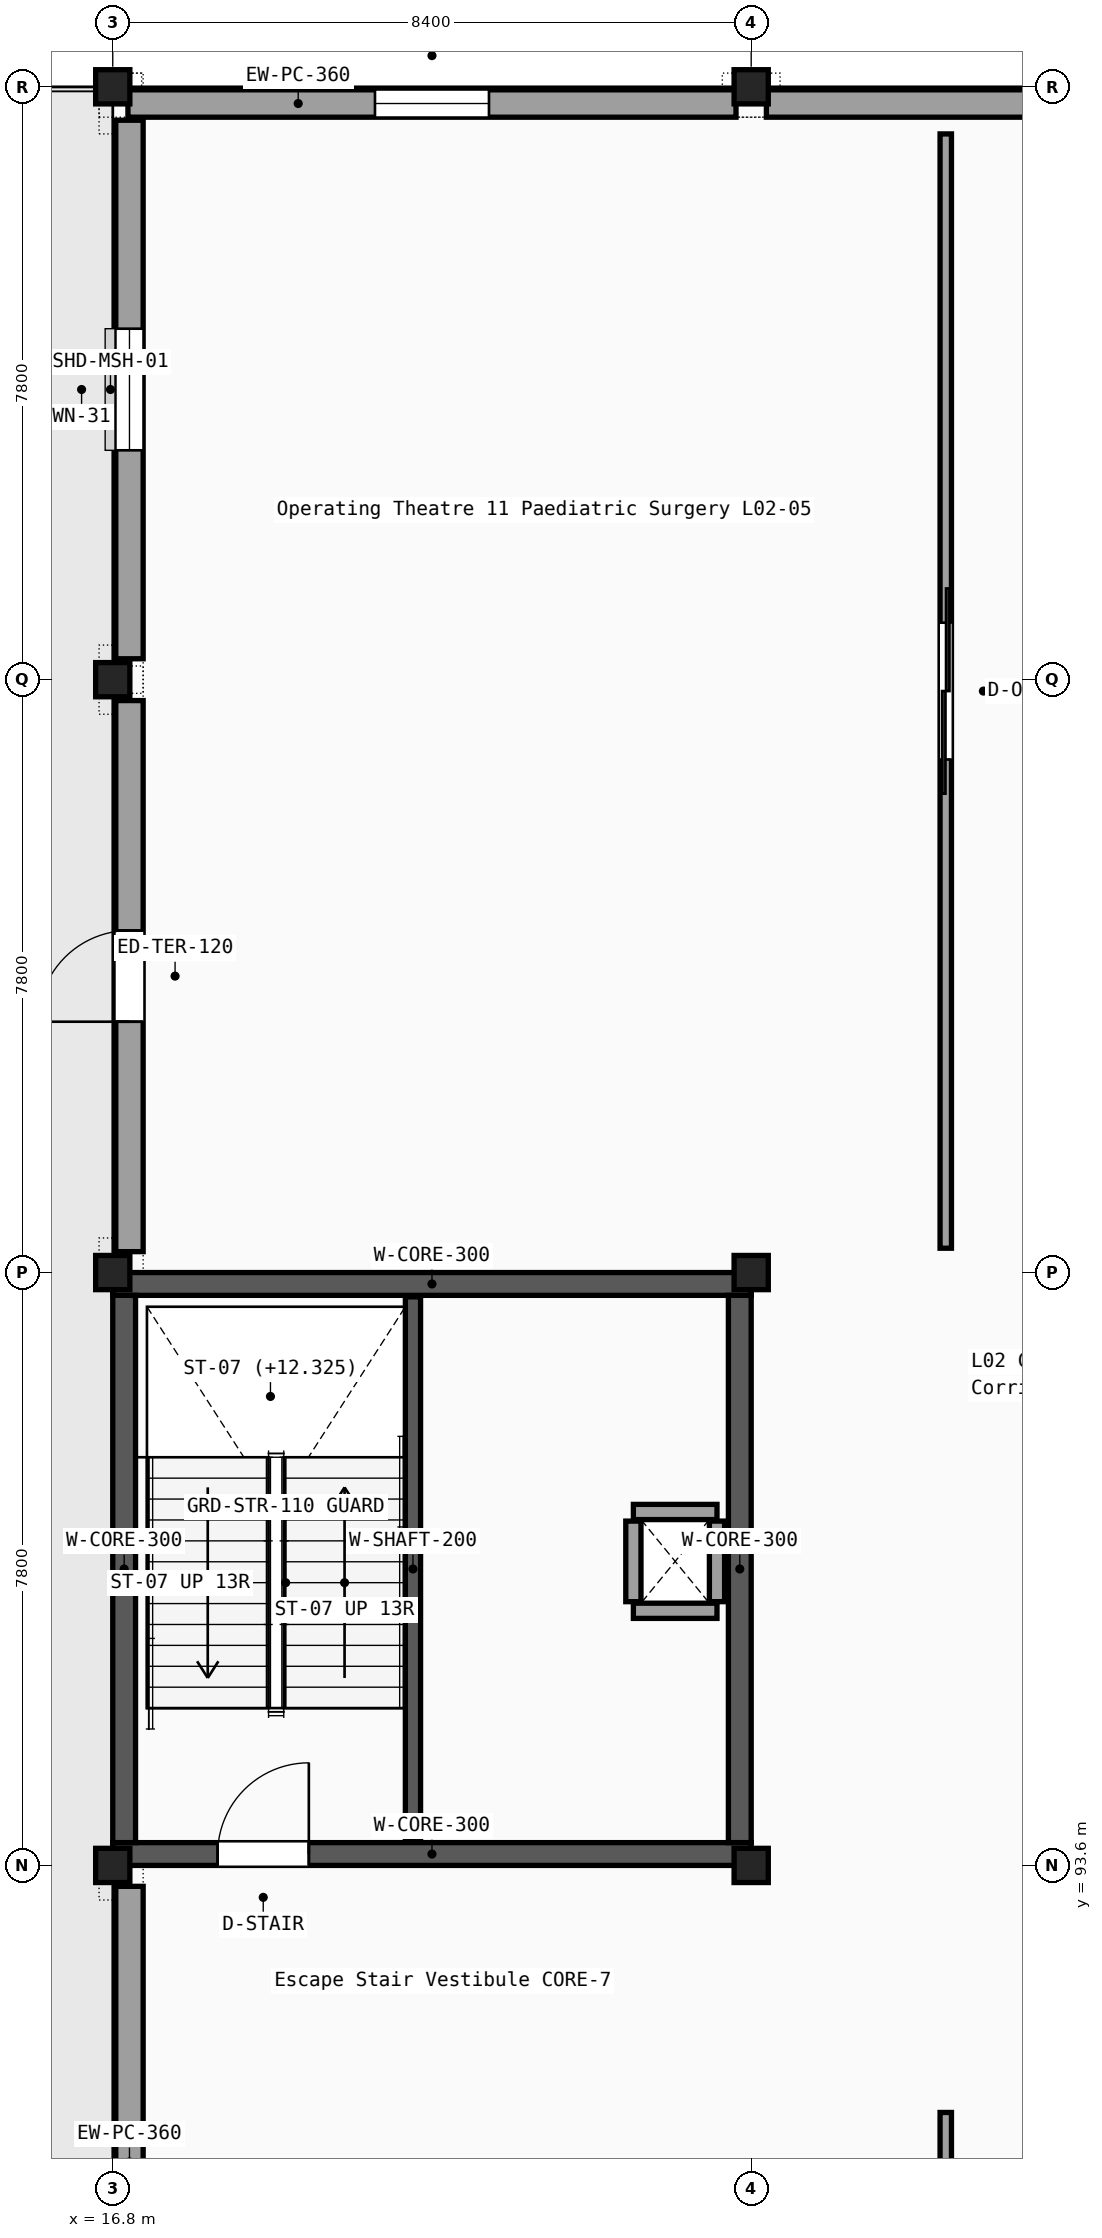
"""IFC4 building model, lengths in metres.
Left out: names, types, materials, properties, quantities, classifications, styles, units other than length and angle.
Written with IfcOpenShell. Run it as: python <this file> out.ifc"""

import sys

from ifc_helpers import new_model, si_unit, direction, frame, frame_2d, origin, origin_2d, place, context, subcontext, project, spatial, rectangle, i_section, extrude, element, fill, save


model = new_model("IFC4")
c1 = context("Model", 3, precision=1e-05, world=origin(), true_north=direction((0.0, 1.0)))
c2 = subcontext(c1, "Body", "Model", "MODEL_VIEW")
j1 = project(units=[si_unit("LENGTHUNIT", "METRE"), si_unit("PLANEANGLEUNIT", "RADIAN")], contexts=[c1])
p1 = place(None, origin())
s1 = spatial("IfcSite", under=j1, at=p1, CompositionType="ELEMENT")
p2 = place(p1, origin())
s2 = spatial("IfcBuilding", under=s1, at=p2, CompositionType="ELEMENT")
p3 = place(p2, frame((0.0, 0.0, 10.2)))
s3 = spatial("IfcBuildingStorey", under=s2, at=p3, CompositionType="ELEMENT", Elevation=10.2)
for number, where, z_axis, x_axis in (
    (1, (16.8, 93.6, 0.0), (0.0, 0.0, 1.0), (1.0, 0.0, 0.0)),
    (2, (16.8, 101.4, 0.0), (0.0, 0.0, 1.0), (1.0, 0.0, 0.0)),
    (3, (16.8, 109.2, 0.0), (0.0, 0.0, 1.0), (1.0, 0.0, 0.0)),
    (4, (16.8, 117.0, 0.0), (0.0, 0.0, 1.0), (1.0, 0.0, 0.0)),
    (5, (25.2, 93.6, 0.0), (0.0, 0.0, 1.0), (1.0, 0.0, 0.0)),
    (6, (25.2, 101.4, 0.0), (0.0, 0.0, 1.0), (1.0, 0.0, 0.0)),
    (7, (25.2, 117.0, 0.0), (0.0, 0.0, 1.0), (1.0, 0.0, 0.0)),
):
    element("IfcColumn", number, at=place(p3, frame(where, z_axis=z_axis, x_axis=x_axis)), inside=s3, PredefinedType="COLUMN", context=c2, shape_type="SweptSolid", body=[
        extrude(i_section(OverallWidth=0.3, OverallDepth=0.45, WebThickness=0.014, FlangeThickness=0.026, FilletRadius=0.027, at=origin_2d()), origin(), (0.0, 0.0, 1.0), 4.65),
    ])
p4 = place(p3, frame((17.02, 86.075, 0.0), z_axis=(0.0, 0.0, 1.0), x_axis=(0.0, 1.0, 0.0)))
e8 = element("IfcWall", 8, at=p4, inside=s3, PredefinedType="SOLIDWALL", context=c2, shape_type="SweptSolid", body=[
    extrude(rectangle(XDim=7.25, YDim=0.36, at=frame_2d((3.625, 0.0))), origin(), (0.0, 0.0, 1.0), 3.82),
])
p5 = place(p3, frame((17.02, 101.675, 0.0), z_axis=(0.0, 0.0, 1.0), x_axis=(0.0, 1.0, 0.0)))
e9 = element("IfcWall", 9, at=p5, inside=s3, PredefinedType="SOLIDWALL", context=c2, shape_type="SweptSolid", body=[
    extrude(rectangle(XDim=7.25, YDim=0.36, at=frame_2d((3.625, 0.0))), origin(), (0.0, 0.0, 1.0), 3.97),
])
p6 = place(p5, frame((3.025, 0.0, 0.0)))
e10 = element("IfcOpeningElement", 10, at=p6, cuts=e9, PredefinedType="OPENING", context=c2, shape_type="SweptSolid", body=[
    extrude(rectangle(XDim=1.2, YDim=2.2, at=frame_2d((0.6, 1.1))), frame((0.0, 0.19, 0.0), z_axis=(0.0, -1.0, 0.0), x_axis=(1.0, 0.0, 0.0)), (0.0, 0.0, 1.0), 0.38),
])
p7 = place(p3, frame((17.02, 109.475, 0.0), z_axis=(0.0, 0.0, 1.0), x_axis=(0.0, 1.0, 0.0)))
e11 = element("IfcWall", 11, at=p7, inside=s3, PredefinedType="SOLIDWALL", context=c2, shape_type="SweptSolid", body=[
    extrude(rectangle(XDim=7.085, YDim=0.36, at=frame_2d((3.542, 0.0))), origin(), (0.0, 0.0, 1.0), 4.01),
])
p8 = place(p7, frame((2.742, 0.0, 0.95)))
e12 = element("IfcOpeningElement", 12, at=p8, cuts=e11, PredefinedType="OPENING", context=c2, shape_type="SweptSolid", body=[
    extrude(rectangle(XDim=1.6, YDim=1.55, at=frame_2d((0.8, 0.775))), frame((0.0, 0.19, 0.0), z_axis=(0.0, -1.0, 0.0), x_axis=(1.0, 0.0, 0.0)), (0.0, 0.0, 1.0), 0.38),
])
p9 = place(p3, frame((17.0, 116.78, 0.0), z_axis=(0.0, 0.0, 1.0), x_axis=(1.0, 0.0, 0.0)))
e13 = element("IfcWall", 13, at=p9, inside=s3, PredefinedType="SOLIDWALL", context=c2, shape_type="SweptSolid", body=[
    extrude(rectangle(XDim=8.0, YDim=0.36, at=frame_2d((4.0, 0.0))), origin(), (0.0, 0.0, 1.0), 4.01),
])
p10 = place(p9, frame((3.25, 0.0, 0.8)))
e14 = element("IfcOpeningElement", 14, at=p10, cuts=e13, PredefinedType="OPENING", context=c2, shape_type="SweptSolid", body=[
    extrude(rectangle(XDim=1.5, YDim=1.75, at=frame_2d((0.75, 0.875))), frame((0.0, 0.19, 0.0), z_axis=(0.0, -1.0, 0.0), x_axis=(1.0, 0.0, 0.0)), (0.0, 0.0, 1.0), 0.38),
])
p11 = place(p3, frame((25.4, 116.78, 0.0), z_axis=(0.0, 0.0, 1.0), x_axis=(1.0, 0.0, 0.0)))
e15 = element("IfcWall", 15, at=p11, inside=s3, PredefinedType="SOLIDWALL", context=c2, shape_type="SweptSolid", body=[
    extrude(rectangle(XDim=8.0, YDim=0.36, at=frame_2d((4.0, 0.0))), origin(), (0.0, 0.0, 1.0), 4.01),
])
p12 = place(p3, frame((16.8, 93.75, 0.0), z_axis=(0.0, 0.0, 1.0), x_axis=(1.0, 0.0, 0.0)))
e16 = element("IfcWall", 16, at=p12, inside=s3, PredefinedType="SHEAR", context=c2, shape_type="SweptSolid", body=[
    extrude(rectangle(XDim=8.4, YDim=0.3, at=frame_2d((4.2, 0.0))), origin(), (0.0, 0.0, 1.0), 4.38),
])
p13 = place(p12, frame((1.38, 0.0, 0.0)))
e17 = element("IfcOpeningElement", 17, at=p13, cuts=e16, PredefinedType="OPENING", context=c2, shape_type="SweptSolid", body=[
    extrude(rectangle(XDim=1.2, YDim=2.15, at=frame_2d((0.6, 1.075))), frame((0.0, 0.16, 0.0), z_axis=(0.0, -1.0, 0.0), x_axis=(1.0, 0.0, 0.0)), (0.0, 0.0, 1.0), 0.32),
])
p14 = place(p3, frame((16.8, 101.25, 0.0), z_axis=(0.0, 0.0, 1.0), x_axis=(1.0, 0.0, 0.0)))
e18 = element("IfcWall", 18, at=p14, inside=s3, PredefinedType="SHEAR", context=c2, shape_type="SweptSolid", body=[
    extrude(rectangle(XDim=8.4, YDim=0.3, at=frame_2d((4.2, 0.0))), origin(), (0.0, 0.0, 1.0), 4.38),
])
for number, where, z_axis, x_axis in (
    (19, (16.95, 93.9, 0.0), (0.0, 0.0, 1.0), (0.0, 1.0, 0.0)),
    (20, (25.05, 93.9, 0.0), (0.0, 0.0, 1.0), (0.0, 1.0, 0.0)),
):
    element("IfcWall", number, at=place(p3, frame(where, z_axis=z_axis, x_axis=x_axis)), inside=s3, PredefinedType="SHEAR", context=c2, shape_type="SweptSolid", body=[
        extrude(rectangle(XDim=7.2, YDim=0.3, at=frame_2d((3.6, 0.0))), origin(), (0.0, 0.0, 1.0), 4.38),
    ])
p15 = place(p3, frame((20.75, 93.92, 0.0), z_axis=(0.0, 0.0, 1.0), x_axis=(0.0, 1.0, 0.0)))
e21 = element("IfcWall", 21, at=p15, inside=s3, PredefinedType="SHEAR", context=c2, shape_type="SweptSolid", body=[
    extrude(rectangle(XDim=7.16, YDim=0.2, at=frame_2d((3.58, 0.0))), origin(), (0.0, 0.0, 1.0), 4.38),
])
for number, where, z_axis, x_axis in (
    (22, (23.65, 96.95, 0.0), (0.0, 0.0, 1.0), (1.0, 0.0, 0.0)),
    (23, (23.65, 98.25, 0.0), (0.0, 0.0, 1.0), (1.0, 0.0, 0.0)),
):
    element("IfcWall", number, at=place(p3, frame(where, z_axis=z_axis, x_axis=x_axis)), inside=s3, PredefinedType="PARTITIONING", context=c2, shape_type="SweptSolid", body=[
        extrude(rectangle(XDim=1.1, YDim=0.2, at=frame_2d((0.55, 0.0))), origin(), (0.0, 0.0, 1.0), 3.82),
    ])
for number, where, z_axis, x_axis in (
    (24, (23.65, 97.07, 0.0), (0.0, 0.0, 1.0), (0.0, 1.0, 0.0)),
    (25, (24.75, 97.07, 0.0), (0.0, 0.0, 1.0), (0.0, 1.0, 0.0)),
):
    element("IfcWall", number, at=place(p3, frame(where, z_axis=z_axis, x_axis=x_axis)), inside=s3, PredefinedType="PARTITIONING", context=c2, shape_type="SweptSolid", body=[
        extrude(rectangle(XDim=1.06, YDim=0.2, at=frame_2d((0.53, 0.0))), origin(), (0.0, 0.0, 1.0), 3.82),
    ])
p16 = place(p3, frame((27.76, 77.867, 0.0), z_axis=(0.0, 0.0, 1.0), x_axis=(0.0, 1.0, 0.0)))
e26 = element("IfcWall", 26, at=p16, inside=s3, PredefinedType="PARTITIONING", context=c2, shape_type="SweptSolid", body=[
    extrude(rectangle(XDim=12.483, YDim=0.15, at=frame_2d((6.241, 0.0))), origin(), (0.0, 0.0, 1.0), 3.82),
])
p17 = place(p16, frame((5.341, 0.0, 0.0)))
e27 = element("IfcOpeningElement", 27, at=p17, cuts=e26, PredefinedType="OPENING", context=c2, shape_type="SweptSolid", body=[
    extrude(rectangle(XDim=1.8, YDim=2.4, at=frame_2d((0.9, 1.2))), frame((0.0, 0.085, 0.0), z_axis=(0.0, -1.0, 0.0), x_axis=(1.0, 0.0, 0.0)), (0.0, 0.0, 1.0), 0.17),
])
p18 = place(p3, frame((27.76, 101.72, 0.0), z_axis=(0.0, 0.0, 1.0), x_axis=(0.0, 1.0, 0.0)))
e28 = element("IfcWall", 28, at=p18, inside=s3, PredefinedType="PARTITIONING", context=c2, shape_type="SweptSolid", body=[
    extrude(rectangle(XDim=14.66, YDim=0.15, at=frame_2d((7.33, 0.0))), origin(), (0.0, 0.0, 1.0), 4.0),
])
p19 = place(p18, frame((6.43, 0.0, 0.0)))
e29 = element("IfcOpeningElement", 29, at=p19, cuts=e28, PredefinedType="OPENING", context=c2, shape_type="SweptSolid", body=[
    extrude(rectangle(XDim=1.8, YDim=2.4, at=frame_2d((0.9, 1.2))), frame((0.0, 0.085, 0.0), z_axis=(0.0, -1.0, 0.0), x_axis=(1.0, 0.0, 0.0)), (0.0, 0.0, 1.0), 0.17),
])
p20 = place(p6, origin())
e30 = element("IfcDoor", 30, at=p20, inside=s3, OperationType="SINGLE_SWING_LEFT", PredefinedType="DOOR", context=c2, shape_type="SweptSolid", body=[
    extrude(rectangle(XDim=1.2, YDim=2.2, at=frame_2d((0.6, 1.1))), frame((0.0, 0.025, 0.0), z_axis=(0.0, -1.0, 0.0), x_axis=(1.0, 0.0, 0.0)), (0.0, 0.0, 1.0), 0.05),
])
fill(e10, e30)
p21 = place(p8, origin())
e31 = element("IfcWindow", 31, at=p21, inside=s3, PartitioningType="SINGLE_PANEL", PredefinedType="WINDOW", context=c2, shape_type="SweptSolid", body=[
    extrude(rectangle(XDim=1.6, YDim=1.55, at=frame_2d((0.8, 0.775))), frame((0.0, 0.03, 0.0), z_axis=(0.0, -1.0, 0.0), x_axis=(1.0, 0.0, 0.0)), (0.0, 0.0, 1.0), 0.06),
])
fill(e12, e31)
p22 = place(p10, origin())
e32 = element("IfcWindow", 32, at=p22, inside=s3, PartitioningType="SINGLE_PANEL", PredefinedType="WINDOW", context=c2, shape_type="SweptSolid", body=[
    extrude(rectangle(XDim=1.5, YDim=1.75, at=frame_2d((0.75, 0.875))), frame((0.0, 0.03, 0.0), z_axis=(0.0, -1.0, 0.0), x_axis=(1.0, 0.0, 0.0)), (0.0, 0.0, 1.0), 0.06),
])
fill(e14, e32)
p23 = place(p13, origin())
e33 = element("IfcDoor", 33, at=p23, inside=s3, OperationType="SINGLE_SWING_RIGHT", PredefinedType="DOOR", context=c2, shape_type="SweptSolid", body=[
    extrude(rectangle(XDim=1.2, YDim=2.15, at=frame_2d((0.6, 1.075))), frame((0.0, 0.025, 0.0), z_axis=(0.0, -1.0, 0.0), x_axis=(1.0, 0.0, 0.0)), (0.0, 0.0, 1.0), 0.05),
])
fill(e17, e33)
p24 = place(p19, origin())
e34 = element("IfcDoor", 34, at=p24, inside=s3, OperationType="DOUBLE_DOOR_SLIDING", PredefinedType="DOOR", context=c2, shape_type="SweptSolid", body=[
    extrude(rectangle(XDim=1.8, YDim=2.4, at=frame_2d((0.9, 1.2))), frame((0.0, 0.025, 0.0), z_axis=(0.0, -1.0, 0.0), x_axis=(1.0, 0.0, 0.0)), (0.0, 0.0, 1.0), 0.05),
])
fill(e29, e34)
save(model, sys.argv[1])
